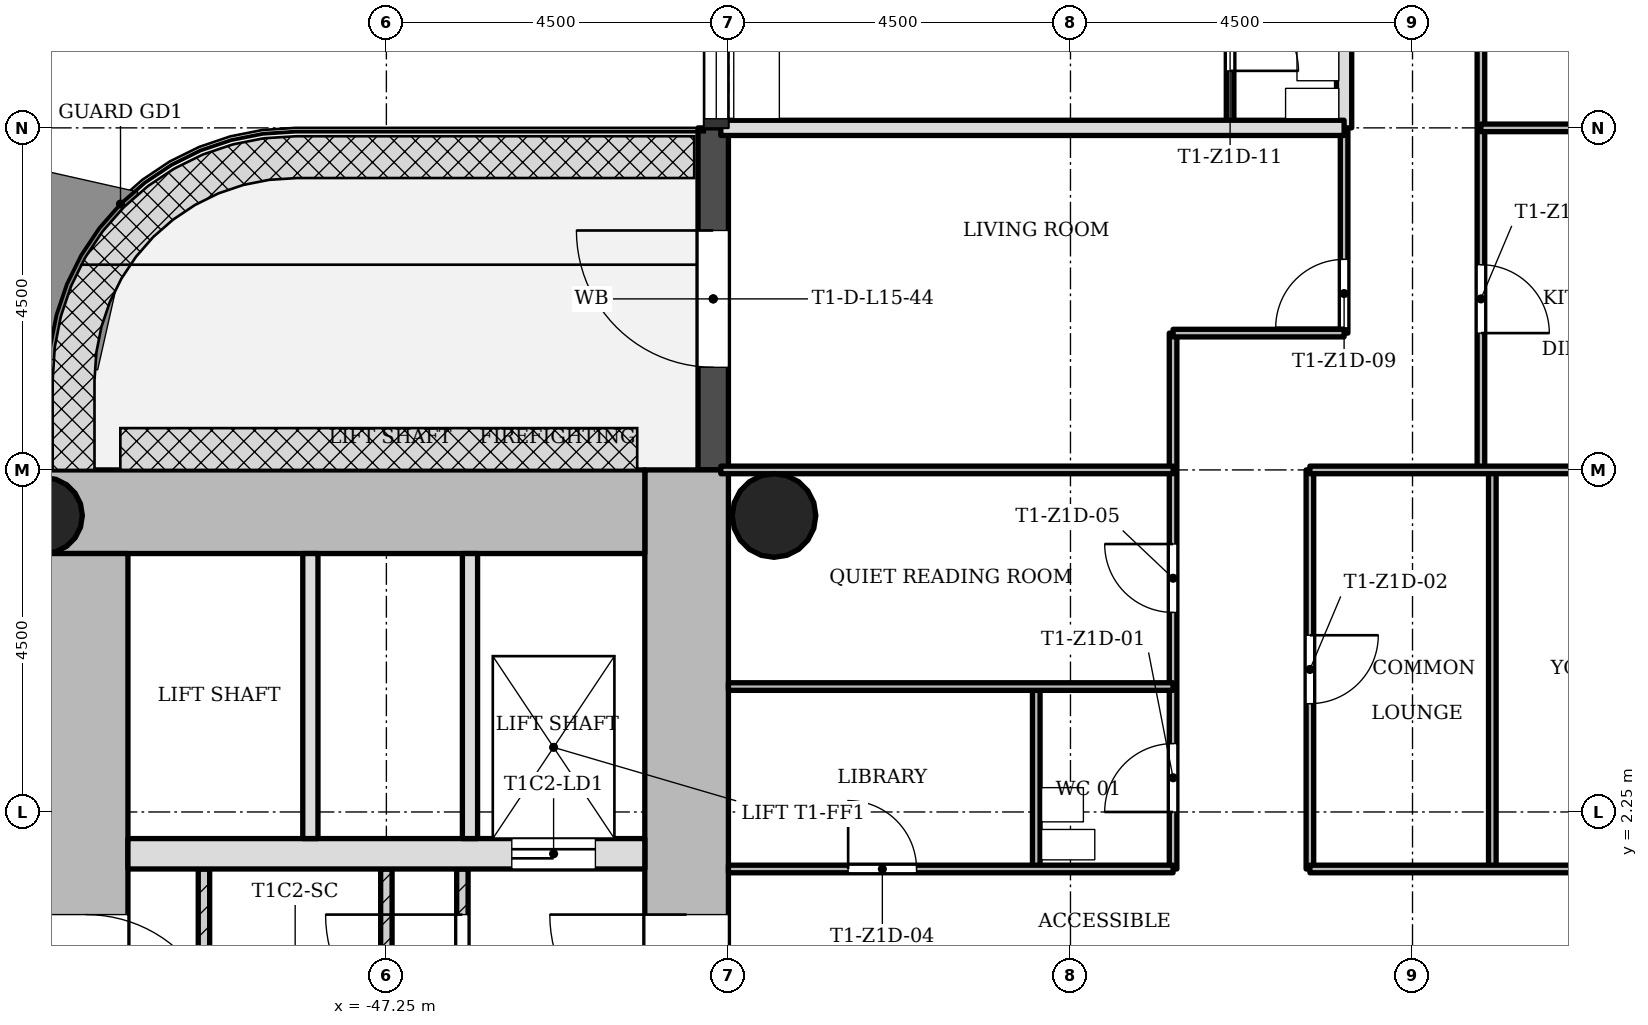
"""IFC4 building model, lengths in metres.
Left out: names, types, materials, properties, quantities, classifications, styles, units other than length and angle.
Written with IfcOpenShell. Run it as: python <this file> out.ifc"""

import sys

from ifc_helpers import new_model, si_unit, direction, frame, frame_2d, origin, origin_2d, place, context, subcontext, project, spatial, rectangle, hollow_circle, extrude, element, fill, save


model = new_model("IFC4")
c1 = context("Model", 3, precision=1e-05, world=origin(), true_north=direction((0.0, 1.0)))
c2 = subcontext(c1, "Body", "Model", "MODEL_VIEW")
j1 = project(units=[si_unit("LENGTHUNIT", "METRE"), si_unit("PLANEANGLEUNIT", "RADIAN")], contexts=[c1])
p1 = place(None, origin())
s1 = spatial("IfcSite", under=j1, at=p1, CompositionType="ELEMENT")
p2 = place(p1, origin())
s2 = spatial("IfcBuilding", under=s1, at=p2, CompositionType="ELEMENT")
p3 = place(p2, frame((0.0, 0.0, 58.5)))
s3 = spatial("IfcBuildingStorey", under=s2, at=p3, CompositionType="ELEMENT", Elevation=58.5)
p4 = place(p3, frame((-43.3, -5.65, 0.0), z_axis=(0.0, 0.0, 1.0), x_axis=(0.0, 1.0, 0.0)))
e1 = element("IfcWall", 1, at=p4, inside=s3, PredefinedType="SHEAR", context=c2, shape_type="SweptSolid", body=[
    extrude(rectangle(XDim=12.4, YDim=1.1, at=frame_2d((6.2, 0.0))), origin(), (0.0, 0.0, 1.0), 3.4),
])
p5 = place(p4, frame((4.75, 0.0, 0.0)))
e2 = element("IfcOpeningElement", 2, at=p5, cuts=e1, PredefinedType="OPENING", context=c2, shape_type="SweptSolid", body=[
    extrude(rectangle(XDim=1.8, YDim=2.1, at=frame_2d((0.9, 1.05))), frame((0.0, 0.56, 0.0), z_axis=(0.0, -1.0, 0.0), x_axis=(1.0, 0.0, 0.0)), (0.0, 0.0, 1.0), 1.12),
])
p6 = place(p3, frame((-43.85, 6.2, 0.0), z_axis=(0.0, 0.0, 1.0), x_axis=(-1.0, 0.0, 0.0)))
e3 = element("IfcWall", 3, at=p6, inside=s3, PredefinedType="SHEAR", context=c2, shape_type="SweptSolid", body=[
    extrude(rectangle(XDim=7.9, YDim=1.1, at=frame_2d((3.95, 0.0))), origin(), (0.0, 0.0, 1.0), 3.4),
])
p7 = place(p3, frame((-51.2, 5.65, 0.0), z_axis=(0.0, 0.0, 1.0), x_axis=(0.0, -1.0, 0.0)))
e4 = element("IfcWall", 4, at=p7, inside=s3, PredefinedType="SHEAR", context=c2, shape_type="SweptSolid", body=[
    extrude(rectangle(XDim=12.4, YDim=1.1, at=frame_2d((6.2, 0.0))), origin(), (0.0, 0.0, 1.0), 3.4),
])
p8 = place(p7, frame((4.75, 0.0, 0.0)))
e5 = element("IfcOpeningElement", 5, at=p8, cuts=e4, PredefinedType="OPENING", context=c2, shape_type="SweptSolid", body=[
    extrude(rectangle(XDim=1.8, YDim=2.1, at=frame_2d((0.9, 1.05))), frame((0.0, 0.56, 0.0), z_axis=(0.0, -1.0, 0.0), x_axis=(1.0, 0.0, 0.0)), (0.0, 0.0, 1.0), 1.12),
])
p9 = place(p3, frame((-50.65, 1.7, 0.0), z_axis=(0.0, 0.0, 1.0), x_axis=(1.0, 0.0, 0.0)))
e6 = element("IfcWall", 6, at=p9, inside=s3, PredefinedType="SHEAR", context=c2, shape_type="SweptSolid", body=[
    extrude(rectangle(XDim=6.8, YDim=0.4, at=frame_2d((3.4, 0.0))), origin(), (0.0, 0.0, 1.0), 3.4),
])
p10 = place(p9, frame((5.05, 0.0, 0.0)))
e7 = element("IfcOpeningElement", 7, at=p10, cuts=e6, PredefinedType="OPENING", context=c2, shape_type="SweptSolid", body=[
    extrude(rectangle(XDim=1.1, YDim=2.1, at=frame_2d((0.55, 1.05))), frame((0.0, 0.21, 0.0), z_axis=(0.0, -1.0, 0.0), x_axis=(1.0, 0.0, 0.0)), (0.0, 0.0, 1.0), 0.42),
])
p11 = place(p3, frame((-51.75, 6.15, 0.0), z_axis=(0.0, 0.0, 1.0), x_axis=(1.0, 0.0, 0.0)))
e8 = element("IfcColumn", 8, at=p11, inside=s3, PredefinedType="COLUMN", context=c2, shape_type="SweptSolid", body=[
    extrude(hollow_circle(Radius=0.5, WallThickness=0.036, at=origin_2d()), origin(), (0.0, 0.0, 1.0), 3.4),
])
p12 = place(p3, frame((-42.15, 6.15, 0.0), z_axis=(0.0, 0.0, 1.0), x_axis=(1.0, 0.0, 0.0)))
e9 = element("IfcColumn", 9, at=p12, inside=s3, PredefinedType="COLUMN", context=c2, shape_type="SweptSolid", body=[
    extrude(hollow_circle(Radius=0.55, WallThickness=0.04, at=origin_2d()), origin(), (0.0, 0.0, 1.0), 3.4),
])
p13 = place(p3, frame((-42.95, 11.25, -0.02), z_axis=(0.0, 0.0, 1.0), x_axis=(0.0, -1.0, 0.0)))
e10 = element("IfcWall", 10, at=p13, inside=s3, PredefinedType="STANDARD", context=c2, shape_type="SweptSolid", body=[
    extrude(rectangle(XDim=4.5, YDim=0.4, at=frame_2d((2.25, 0.0))), origin(), (0.0, 0.0, 1.0), 3.12),
])
p14 = place(p13, frame((1.35, 0.0, 0.02)))
e11 = element("IfcOpeningElement", 11, at=p14, cuts=e10, PredefinedType="OPENING", context=c2, shape_type="SweptSolid", body=[
    extrude(rectangle(XDim=1.8, YDim=2.1, at=frame_2d((0.9, 1.05))), frame((0.0, 0.21, 0.0), z_axis=(0.0, -1.0, 0.0), x_axis=(1.0, 0.0, 0.0)), (0.0, 0.0, 1.0), 0.42),
])
p15 = place(p3, frame((-46.25, 1.5, 0.0), z_axis=(0.0, 0.0, 1.0), x_axis=(0.0, -1.0, 0.0)))
e12 = element("IfcWall", 12, at=p15, inside=s3, PredefinedType="PARTITIONING", context=c2, shape_type="SweptSolid", body=[
    extrude(rectangle(XDim=3.0, YDim=0.15, at=frame_2d((1.5, 0.0))), origin(), (0.0, 0.0, 1.0), 3.0),
])
p16 = place(p15, frame((0.6, 0.0, 0.0)))
e13 = element("IfcOpeningElement", 13, at=p16, cuts=e12, PredefinedType="OPENING", context=c2, shape_type="SweptSolid", body=[
    extrude(rectangle(XDim=1.8, YDim=2.1, at=frame_2d((0.9, 1.05))), frame((0.0, 0.085, 0.0), z_axis=(0.0, -1.0, 0.0), x_axis=(1.0, 0.0, 0.0)), (0.0, 0.0, 1.0), 0.17),
])
for number, where, z_axis, x_axis in (
    (14, (-46.15, 5.65, 0.0), (0.0, 0.0, 1.0), (0.0, -1.0, 0.0)),
    (15, (-48.25, 5.65, 0.0), (0.0, 0.0, 1.0), (0.0, -1.0, 0.0)),
):
    element("IfcWall", number, at=place(p3, frame(where, z_axis=z_axis, x_axis=x_axis)), inside=s3, PredefinedType="SOLIDWALL", context=c2, shape_type="SweptSolid", body=[
        extrude(rectangle(XDim=3.75, YDim=0.2, at=frame_2d((1.875, 0.0))), origin(), (0.0, 0.0, 1.0), 3.0),
    ])
for number, where, z_axis, x_axis in (
    (16, (-47.25, 0.3, 0.0), (0.0, 0.0, 1.0), (0.0, 1.0, 0.0)),
    (17, (-49.65, 0.3, 0.0), (0.0, 0.0, 1.0), (0.0, 1.0, 0.0)),
):
    element("IfcWall", number, at=place(p3, frame(where, z_axis=z_axis, x_axis=x_axis)), inside=s3, PredefinedType="PARTITIONING", context=c2, shape_type="SweptSolid", body=[
        extrude(rectangle(XDim=1.2, YDim=0.15, at=frame_2d((0.6, 0.0))), origin(), (0.0, 0.0, 1.0), 3.0),
    ])
p17 = place(p3, frame((-38.7, 1.5, 0.0), z_axis=(0.0, 0.0, 1.0), x_axis=(0.0, 1.0, 0.0)))
e18 = element("IfcWall", 18, at=p17, inside=s3, PredefinedType="PARTITIONING", context=c2, shape_type="SweptSolid", body=[
    extrude(rectangle(XDim=2.4, YDim=0.1, at=frame_2d((1.2, 0.0))), origin(), (0.0, 0.0, 1.0), 3.0),
])
p18 = place(p3, frame((-36.9, 1.5, 0.0), z_axis=(0.0, 0.0, 1.0), x_axis=(0.0, 1.0, 0.0)))
e19 = element("IfcWall", 19, at=p18, inside=s3, PredefinedType="PARTITIONING", context=c2, shape_type="SweptSolid", body=[
    extrude(rectangle(XDim=7.05, YDim=0.1, at=frame_2d((3.525, 0.0))), origin(), (0.0, 0.0, 1.0), 3.0),
])
p19 = place(p18, frame((0.75, 0.0, 0.0)))
e20 = element("IfcOpeningElement", 20, at=p19, cuts=e19, PredefinedType="OPENING", context=c2, shape_type="SweptSolid", body=[
    extrude(rectangle(XDim=0.9, YDim=2.1, at=frame_2d((0.45, 1.05))), frame((0.0, 0.06, 0.0), z_axis=(0.0, -1.0, 0.0), x_axis=(1.0, 0.0, 0.0)), (0.0, 0.0, 1.0), 0.12),
])
p20 = place(p18, frame((3.375, 0.0, 0.0)))
e21 = element("IfcOpeningElement", 21, at=p20, cuts=e19, PredefinedType="OPENING", context=c2, shape_type="SweptSolid", body=[
    extrude(rectangle(XDim=0.9, YDim=2.1, at=frame_2d((0.45, 1.05))), frame((0.0, 0.06, 0.0), z_axis=(0.0, -1.0, 0.0), x_axis=(1.0, 0.0, 0.0)), (0.0, 0.0, 1.0), 0.12),
])
p21 = place(p3, frame((-36.15, 11.25, 0.0), z_axis=(0.0, 0.0, 1.0), x_axis=(0.0, 1.0, 0.0)))
e22 = element("IfcWall", 22, at=p21, inside=s3, PredefinedType="PARTITIONING", context=c2, shape_type="SweptSolid", body=[
    extrude(rectangle(XDim=2.4, YDim=0.1, at=frame_2d((1.2, 0.0))), origin(), (0.0, 0.0, 1.0), 3.0),
])
p22 = place(p21, frame((0.75, 0.0, 0.0)))
e23 = element("IfcOpeningElement", 23, at=p22, cuts=e22, PredefinedType="OPENING", context=c2, shape_type="SweptSolid", body=[
    extrude(rectangle(XDim=0.9, YDim=2.1, at=frame_2d((0.45, 1.05))), frame((0.0, 0.06, 0.0), z_axis=(0.0, -1.0, 0.0), x_axis=(1.0, 0.0, 0.0)), (0.0, 0.0, 1.0), 0.12),
])
p23 = place(p3, frame((-35.1, 1.5, 0.0), z_axis=(0.0, 0.0, 1.0), x_axis=(0.0, 1.0, 0.0)))
e24 = element("IfcWall", 24, at=p23, inside=s3, PredefinedType="PARTITIONING", context=c2, shape_type="SweptSolid", body=[
    extrude(rectangle(XDim=5.25, YDim=0.1, at=frame_2d((2.625, 0.0))), origin(), (0.0, 0.0, 1.0), 3.0),
])
p24 = place(p23, frame((2.175, 0.0, 0.0)))
e25 = element("IfcOpeningElement", 25, at=p24, cuts=e24, PredefinedType="OPENING", context=c2, shape_type="SweptSolid", body=[
    extrude(rectangle(XDim=0.9, YDim=2.1, at=frame_2d((0.45, 1.05))), frame((0.0, 0.06, 0.0), z_axis=(0.0, -1.0, 0.0), x_axis=(1.0, 0.0, 0.0)), (0.0, 0.0, 1.0), 0.12),
])
p25 = place(p3, frame((-34.65, 8.55, 0.0), z_axis=(0.0, 0.0, 1.0), x_axis=(0.0, 1.0, 0.0)))
e26 = element("IfcWall", 26, at=p25, inside=s3, PredefinedType="PARTITIONING", context=c2, shape_type="SweptSolid", body=[
    extrude(rectangle(XDim=2.7, YDim=0.1, at=frame_2d((1.35, 0.0))), origin(), (0.0, 0.0, 1.0), 3.0),
])
p26 = place(p25, frame((0.07, 0.0, 0.0)))
e27 = element("IfcOpeningElement", 27, at=p26, cuts=e26, PredefinedType="OPENING", context=c2, shape_type="SweptSolid", body=[
    extrude(rectangle(XDim=0.9, YDim=2.1, at=frame_2d((0.45, 1.05))), frame((0.0, 0.06, 0.0), z_axis=(0.0, -1.0, 0.0), x_axis=(1.0, 0.0, 0.0)), (0.0, 0.0, 1.0), 0.12),
])
p27 = place(p3, frame((-34.65, 11.25, 0.0), z_axis=(0.0, 0.0, 1.0), x_axis=(0.0, 1.0, 0.0)))
e28 = element("IfcWall", 28, at=p27, inside=s3, PredefinedType="SOLIDWALL", context=c2, shape_type="SweptSolid", body=[
    extrude(rectangle(XDim=4.5, YDim=0.2, at=frame_2d((2.25, 0.0))), origin(), (0.0, 0.0, 1.0), 3.0),
])
p28 = place(p27, frame((3.0, 0.0, 0.0)))
e29 = element("IfcOpeningElement", 29, at=p28, cuts=e28, PredefinedType="OPENING", context=c2, shape_type="SweptSolid", body=[
    extrude(rectangle(XDim=0.9, YDim=2.1, at=frame_2d((0.45, 1.05))), frame((0.0, 0.11, 0.0), z_axis=(0.0, -1.0, 0.0), x_axis=(1.0, 0.0, 0.0)), (0.0, 0.0, 1.0), 0.22),
])
p29 = place(p3, frame((-32.85, 6.75, 0.0), z_axis=(0.0, 0.0, 1.0), x_axis=(0.0, 1.0, 0.0)))
e30 = element("IfcWall", 30, at=p29, inside=s3, PredefinedType="PARTITIONING", context=c2, shape_type="SweptSolid", body=[
    extrude(rectangle(XDim=9.0, YDim=0.1, at=frame_2d((4.5, 0.0))), origin(), (0.0, 0.0, 1.0), 3.0),
])
p30 = place(p29, frame((1.8, 0.0, 0.0)))
e31 = element("IfcOpeningElement", 31, at=p30, cuts=e30, PredefinedType="OPENING", context=c2, shape_type="SweptSolid", body=[
    extrude(rectangle(XDim=0.9, YDim=2.1, at=frame_2d((0.45, 1.05))), frame((0.0, 0.06, 0.0), z_axis=(0.0, -1.0, 0.0), x_axis=(1.0, 0.0, 0.0)), (0.0, 0.0, 1.0), 0.12),
])
p31 = place(p29, frame((6.3, 0.0, 0.0)))
e32 = element("IfcOpeningElement", 32, at=p31, cuts=e30, PredefinedType="OPENING", context=c2, shape_type="SweptSolid", body=[
    extrude(rectangle(XDim=0.9, YDim=2.1, at=frame_2d((0.45, 1.05))), frame((0.0, 0.06, 0.0), z_axis=(0.0, -1.0, 0.0), x_axis=(1.0, 0.0, 0.0)), (0.0, 0.0, 1.0), 0.12),
])
p32 = place(p3, frame((-32.7, 1.5, 0.0), z_axis=(0.0, 0.0, 1.0), x_axis=(0.0, 1.0, 0.0)))
e33 = element("IfcWall", 33, at=p32, inside=s3, PredefinedType="PARTITIONING", context=c2, shape_type="SweptSolid", body=[
    extrude(rectangle(XDim=5.25, YDim=0.1, at=frame_2d((2.625, 0.0))), origin(), (0.0, 0.0, 1.0), 3.0),
])
p33 = place(p3, frame((-42.75, 1.5, 0.0), z_axis=(0.0, 0.0, 1.0), x_axis=(1.0, 0.0, 0.0)))
e34 = element("IfcWall", 34, at=p33, inside=s3, PredefinedType="PARTITIONING", context=c2, shape_type="SweptSolid", body=[
    extrude(rectangle(XDim=5.85, YDim=0.1, at=frame_2d((2.925, 0.0))), origin(), (0.0, 0.0, 1.0), 3.0),
])
p34 = place(p33, frame((1.575, 0.0, 0.0)))
e35 = element("IfcOpeningElement", 35, at=p34, cuts=e34, PredefinedType="OPENING", context=c2, shape_type="SweptSolid", body=[
    extrude(rectangle(XDim=0.9, YDim=2.1, at=frame_2d((0.45, 1.05))), frame((0.0, 0.06, 0.0), z_axis=(0.0, -1.0, 0.0), x_axis=(1.0, 0.0, 0.0)), (0.0, 0.0, 1.0), 0.12),
])
p35 = place(p3, frame((-35.1, 1.5, 0.0), z_axis=(0.0, 0.0, 1.0), x_axis=(1.0, 0.0, 0.0)))
e36 = element("IfcWall", 36, at=p35, inside=s3, PredefinedType="PARTITIONING", context=c2, shape_type="SweptSolid", body=[
    extrude(rectangle(XDim=5.85, YDim=0.1, at=frame_2d((2.925, 0.0))), origin(), (0.0, 0.0, 1.0), 3.0),
])
p36 = place(p35, frame((3.675, 0.0, 0.0)))
e37 = element("IfcOpeningElement", 37, at=p36, cuts=e36, PredefinedType="OPENING", context=c2, shape_type="SweptSolid", body=[
    extrude(rectangle(XDim=0.9, YDim=2.1, at=frame_2d((0.45, 1.05))), frame((0.0, 0.06, 0.0), z_axis=(0.0, -1.0, 0.0), x_axis=(1.0, 0.0, 0.0)), (0.0, 0.0, 1.0), 0.12),
])
p37 = place(p3, frame((-42.75, 3.9, 0.0), z_axis=(0.0, 0.0, 1.0), x_axis=(1.0, 0.0, 0.0)))
e38 = element("IfcWall", 38, at=p37, inside=s3, PredefinedType="PARTITIONING", context=c2, shape_type="SweptSolid", body=[
    extrude(rectangle(XDim=5.85, YDim=0.1, at=frame_2d((2.925, 0.0))), origin(), (0.0, 0.0, 1.0), 3.0),
])
for number, where, z_axis, x_axis in (
    (39, (-42.85, 6.75, 0.0), (0.0, 0.0, 1.0), (1.0, 0.0, 0.0)),
    (40, (-35.1, 6.75, 0.0), (0.0, 0.0, 1.0), (1.0, 0.0, 0.0)),
):
    element("IfcWall", number, at=place(p3, frame(where, z_axis=z_axis, x_axis=x_axis)), inside=s3, PredefinedType="PARTITIONING", context=c2, shape_type="SweptSolid", body=[
        extrude(rectangle(XDim=5.95, YDim=0.1, at=frame_2d((2.975, 0.0))), origin(), (0.0, 0.0, 1.0), 3.0),
    ])
p38 = place(p3, frame((-36.9, 8.55, 0.0), z_axis=(0.0, 0.0, 1.0), x_axis=(1.0, 0.0, 0.0)))
e41 = element("IfcWall", 41, at=p38, inside=s3, PredefinedType="PARTITIONING", context=c2, shape_type="SweptSolid", body=[
    extrude(rectangle(XDim=2.25, YDim=0.1, at=frame_2d((1.125, 0.0))), origin(), (0.0, 0.0, 1.0), 3.0),
])
p39 = place(p3, frame((-32.85, 11.25, 0.0), z_axis=(0.0, 0.0, 1.0), x_axis=(1.0, 0.0, 0.0)))
e42 = element("IfcWall", 42, at=p39, inside=s3, PredefinedType="PARTITIONING", context=c2, shape_type="SweptSolid", body=[
    extrude(rectangle(XDim=3.7, YDim=0.1, at=frame_2d((1.85, 0.0))), origin(), (0.0, 0.0, 1.0), 3.0),
])
p40 = place(p3, frame((-42.85, 11.25, 0.0), z_axis=(0.0, 0.0, 1.0), x_axis=(1.0, 0.0, 0.0)))
e43 = element("IfcWall", 43, at=p40, inside=s3, PredefinedType="SOLIDWALL", context=c2, shape_type="SweptSolid", body=[
    extrude(rectangle(XDim=8.2, YDim=0.2, at=frame_2d((4.1, 0.0))), origin(), (0.0, 0.0, 1.0), 3.0),
])
p41 = place(p14, origin())
e44 = element("IfcDoor", 44, at=p41, inside=s3, OperationType="SINGLE_SWING_LEFT", PredefinedType="DOOR", context=c2, shape_type="SweptSolid", body=[
    extrude(rectangle(XDim=1.8, YDim=2.1, at=frame_2d((0.9, 1.05))), frame((0.0, 0.025, 0.0), z_axis=(0.0, -1.0, 0.0), x_axis=(1.0, 0.0, 0.0)), (0.0, 0.0, 1.0), 0.05),
])
fill(e11, e44)
p42 = place(p16, origin())
e45 = element("IfcDoor", 45, at=p42, inside=s3, OperationType="SINGLE_SWING_LEFT", PredefinedType="DOOR", context=c2, shape_type="SweptSolid", body=[
    extrude(rectangle(XDim=1.8, YDim=2.1, at=frame_2d((0.9, 1.05))), frame((0.0, 0.025, 0.0), z_axis=(0.0, -1.0, 0.0), x_axis=(1.0, 0.0, 0.0)), (0.0, 0.0, 1.0), 0.05),
])
fill(e13, e45)
p43 = place(p19, origin())
e46 = element("IfcDoor", 46, at=p43, inside=s3, OperationType="SINGLE_SWING_RIGHT", PredefinedType="DOOR", context=c2, shape_type="SweptSolid", body=[
    extrude(rectangle(XDim=0.9, YDim=2.1, at=frame_2d((0.45, 1.05))), frame((0.0, 0.025, 0.0), z_axis=(0.0, -1.0, 0.0), x_axis=(1.0, 0.0, 0.0)), (0.0, 0.0, 1.0), 0.05),
])
fill(e20, e46)
p44 = place(p24, origin())
e47 = element("IfcDoor", 47, at=p44, inside=s3, OperationType="SINGLE_SWING_RIGHT", PredefinedType="DOOR", context=c2, shape_type="SweptSolid", body=[
    extrude(rectangle(XDim=0.9, YDim=2.1, at=frame_2d((0.45, 1.05))), frame((0.0, 0.025, 0.0), z_axis=(0.0, -1.0, 0.0), x_axis=(1.0, 0.0, 0.0)), (0.0, 0.0, 1.0), 0.05),
])
fill(e25, e47)
p45 = place(p34, origin())
e48 = element("IfcDoor", 48, at=p45, inside=s3, OperationType="SINGLE_SWING_RIGHT", PredefinedType="DOOR", context=c2, shape_type="SweptSolid", body=[
    extrude(rectangle(XDim=0.9, YDim=2.1, at=frame_2d((0.45, 1.05))), frame((0.0, 0.025, 0.0), z_axis=(0.0, -1.0, 0.0), x_axis=(1.0, 0.0, 0.0)), (0.0, 0.0, 1.0), 0.05),
])
fill(e35, e48)
p46 = place(p20, origin())
e49 = element("IfcDoor", 49, at=p46, inside=s3, OperationType="SINGLE_SWING_LEFT", PredefinedType="DOOR", context=c2, shape_type="SweptSolid", body=[
    extrude(rectangle(XDim=0.9, YDim=2.1, at=frame_2d((0.45, 1.05))), frame((0.0, 0.025, 0.0), z_axis=(0.0, -1.0, 0.0), x_axis=(1.0, 0.0, 0.0)), (0.0, 0.0, 1.0), 0.05),
])
fill(e21, e49)
p47 = place(p26, origin())
e50 = element("IfcDoor", 50, at=p47, inside=s3, OperationType="SINGLE_SWING_RIGHT", PredefinedType="DOOR", context=c2, shape_type="SweptSolid", body=[
    extrude(rectangle(XDim=0.9, YDim=2.1, at=frame_2d((0.45, 1.05))), frame((0.0, 0.025, 0.0), z_axis=(0.0, -1.0, 0.0), x_axis=(1.0, 0.0, 0.0)), (0.0, 0.0, 1.0), 0.05),
])
fill(e27, e50)
p48 = place(p22, origin())
e51 = element("IfcDoor", 51, at=p48, inside=s3, OperationType="SINGLE_SWING_LEFT", PredefinedType="DOOR", context=c2, shape_type="SweptSolid", body=[
    extrude(rectangle(XDim=0.9, YDim=2.1, at=frame_2d((0.45, 1.05))), frame((0.0, 0.025, 0.0), z_axis=(0.0, -1.0, 0.0), x_axis=(1.0, 0.0, 0.0)), (0.0, 0.0, 1.0), 0.05),
])
fill(e23, e51)
p49 = place(p30, origin())
e52 = element("IfcDoor", 52, at=p49, inside=s3, OperationType="SINGLE_SWING_LEFT", PredefinedType="DOOR", context=c2, shape_type="SweptSolid", body=[
    extrude(rectangle(XDim=0.9, YDim=2.1, at=frame_2d((0.45, 1.05))), frame((0.0, 0.025, 0.0), z_axis=(0.0, -1.0, 0.0), x_axis=(1.0, 0.0, 0.0)), (0.0, 0.0, 1.0), 0.05),
])
fill(e31, e52)
p50 = place(p10, origin())
e53 = element("IfcDoor", 53, at=p50, inside=s3, OperationType="SLIDING_TO_LEFT", PredefinedType="DOOR", context=c2, shape_type="SweptSolid", body=[
    extrude(rectangle(XDim=1.1, YDim=2.1, at=frame_2d((0.55, 1.05))), frame((0.0, 0.025, 0.0), z_axis=(0.0, -1.0, 0.0), x_axis=(1.0, 0.0, 0.0)), (0.0, 0.0, 1.0), 0.05),
])
fill(e7, e53)
p51 = place(p5, origin())
e54 = element("IfcDoor", 54, at=p51, inside=s3, OperationType="SINGLE_SWING_LEFT", PredefinedType="DOOR", context=c2, shape_type="SweptSolid", body=[
    extrude(rectangle(XDim=1.8, YDim=2.1, at=frame_2d((0.9, 1.05))), frame((0.0, 0.025, 0.0), z_axis=(0.0, -1.0, 0.0), x_axis=(1.0, 0.0, 0.0)), (0.0, 0.0, 1.0), 0.05),
])
fill(e2, e54)
p52 = place(p8, origin())
e55 = element("IfcDoor", 55, at=p52, inside=s3, OperationType="SINGLE_SWING_LEFT", PredefinedType="DOOR", context=c2, shape_type="SweptSolid", body=[
    extrude(rectangle(XDim=1.8, YDim=2.1, at=frame_2d((0.9, 1.05))), frame((0.0, 0.025, 0.0), z_axis=(0.0, -1.0, 0.0), x_axis=(1.0, 0.0, 0.0)), (0.0, 0.0, 1.0), 0.05),
])
fill(e5, e55)
save(model, sys.argv[1])
